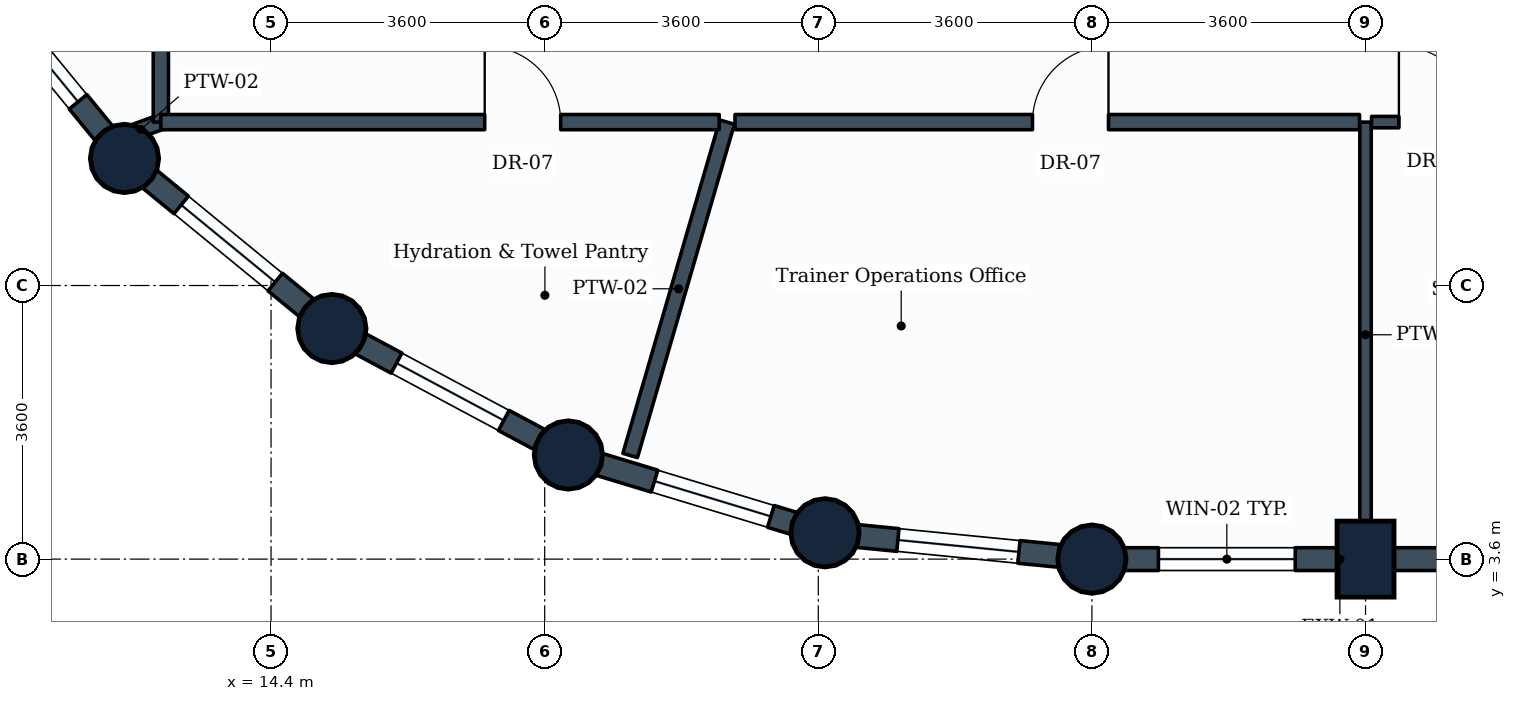
"""IFC4 building model, lengths in metres.
Left out: names, types, materials, properties, quantities, classifications, styles, units other than length and angle.
Written with IfcOpenShell. Run it as: python <this file> out.ifc"""

import sys

from ifc_helpers import new_model, si_unit, direction, frame, frame_2d, origin, origin_2d, place, context, subcontext, project, spatial, rectangle, circle, extrude, element, fill, save


model = new_model("IFC4")
c1 = context("Model", 3, precision=1e-05, world=origin(), true_north=direction((0.0, 1.0)))
c2 = subcontext(c1, "Body", "Model", "MODEL_VIEW")
j1 = project(units=[si_unit("LENGTHUNIT", "METRE"), si_unit("PLANEANGLEUNIT", "RADIAN")], contexts=[c1])
p1 = place(None, origin())
s1 = spatial("IfcSite", under=j1, at=p1, CompositionType="ELEMENT")
p2 = place(p1, origin())
s2 = spatial("IfcBuilding", under=s1, at=p2, CompositionType="ELEMENT")
p3 = place(p2, frame((0.0, 0.0, 142.8)))
s3 = spatial("IfcBuildingStorey", under=s2, at=p3, CompositionType="ELEMENT", Elevation=142.8)
for number, where, z_axis, x_axis in (
    (1, (12.472, 8.872, 0.0), (0.0, 0.0, 1.0), (1.0, 0.0, 0.0)),
    (2, (15.2, 6.634, 0.0), (0.0, 0.0, 1.0), (1.0, 0.0, 0.0)),
    (3, (18.312, 4.97, 0.0), (0.0, 0.0, 1.0), (1.0, 0.0, 0.0)),
    (4, (21.688, 3.946, 0.0), (0.0, 0.0, 1.0), (1.0, 0.0, 0.0)),
    (5, (25.2, 3.6, 0.0), (0.0, 0.0, 1.0), (1.0, 0.0, 0.0)),
):
    element("IfcColumn", number, at=place(p3, frame(where, z_axis=z_axis, x_axis=x_axis)), inside=s3, PredefinedType="COLUMN", context=c2, shape_type="SweptSolid", body=[
        extrude(circle(Radius=0.45, at=origin_2d()), origin(), (0.0, 0.0, 1.0), 3.8),
    ])
p4 = place(p3, frame((28.8, 3.6, 0.0), z_axis=(0.0, 0.0, 1.0), x_axis=(1.0, 0.0, 0.0)))
e6 = element("IfcColumn", 6, at=p4, inside=s3, PredefinedType="COLUMN", context=c2, shape_type="SweptSolid", body=[
    extrude(rectangle(XDim=0.75, YDim=1.0, at=origin_2d()), origin(), (0.0, 0.0, 1.0), 3.8),
])
p5 = place(p3, frame((28.8, 3.6, 0.0), z_axis=(0.0, 0.0, 1.0), x_axis=(-1.0, 0.0, 0.0)))
e7 = element("IfcWall", 7, at=p5, inside=s3, PredefinedType="STANDARD", context=c2, shape_type="SweptSolid", body=[
    extrude(rectangle(XDim=3.6, YDim=0.3, at=frame_2d((1.8, 0.0))), origin(), (0.0, 0.0, 1.0), 2.93),
])
p6 = place(p5, frame((0.925, 0.0, 0.85)))
e8 = element("IfcOpeningElement", 8, at=p6, cuts=e7, PredefinedType="OPENING", context=c2, shape_type="SweptSolid", body=[
    extrude(rectangle(XDim=1.8, YDim=1.35, at=frame_2d((0.9, 0.675))), frame((0.0, 0.16, 0.0), z_axis=(0.0, -1.0, 0.0), x_axis=(1.0, 0.0, 0.0)), (0.0, 0.0, 1.0), 0.32),
])
p7 = place(p3, frame((32.4, 3.6, 0.0), z_axis=(0.0, 0.0, 1.0), x_axis=(-1.0, 0.0, 0.0)))
e9 = element("IfcWall", 9, at=p7, inside=s3, PredefinedType="STANDARD", context=c2, shape_type="SweptSolid", body=[
    extrude(rectangle(XDim=3.6, YDim=0.3, at=frame_2d((1.8, 0.0))), origin(), (0.0, 0.0, 1.0), 2.93),
])
p8 = place(p3, frame((12.472, 8.872, 0.0), z_axis=(0.0, 0.0, 1.0), x_axis=(-0.634258295121, 0.773121216285, 0.0)))
e10 = element("IfcWall", 10, at=p8, inside=s3, PredefinedType="STANDARD", context=c2, shape_type="SweptSolid", body=[
    extrude(rectangle(XDim=3.529, YDim=0.3, at=frame_2d((1.764, 0.0))), origin(), (0.0, 0.0, 1.0), 2.93),
])
p9 = place(p8, frame((0.964, 0.0, 0.85)))
e11 = element("IfcOpeningElement", 11, at=p9, cuts=e10, PredefinedType="OPENING", context=c2, shape_type="SweptSolid", body=[
    extrude(rectangle(XDim=1.6, YDim=1.35, at=frame_2d((0.8, 0.675))), frame((0.0, 0.16, 0.0), z_axis=(0.0, -1.0, 0.0), x_axis=(1.0, 0.0, 0.0)), (0.0, 0.0, 1.0), 0.32),
])
p10 = place(p3, frame((15.2, 6.634, 0.0), z_axis=(0.0, 0.0, 1.0), x_axis=(-0.773121216285, 0.634258295121, 0.0)))
e12 = element("IfcWall", 12, at=p10, inside=s3, PredefinedType="STANDARD", context=c2, shape_type="SweptSolid", body=[
    extrude(rectangle(XDim=3.529, YDim=0.3, at=frame_2d((1.764, 0.0))), origin(), (0.0, 0.0, 1.0), 2.93),
])
p11 = place(p10, frame((0.964, 0.0, 0.85)))
e13 = element("IfcOpeningElement", 13, at=p11, cuts=e12, PredefinedType="OPENING", context=c2, shape_type="SweptSolid", body=[
    extrude(rectangle(XDim=1.6, YDim=1.35, at=frame_2d((0.8, 0.675))), frame((0.0, 0.16, 0.0), z_axis=(0.0, -1.0, 0.0), x_axis=(1.0, 0.0, 0.0)), (0.0, 0.0, 1.0), 0.32),
])
p12 = place(p3, frame((18.312, 4.97, 0.0), z_axis=(0.0, 0.0, 1.0), x_axis=(-0.881846862014, 0.471535907389, 0.0)))
e14 = element("IfcWall", 14, at=p12, inside=s3, PredefinedType="STANDARD", context=c2, shape_type="SweptSolid", body=[
    extrude(rectangle(XDim=3.529, YDim=0.3, at=frame_2d((1.765, 0.0))), origin(), (0.0, 0.0, 1.0), 2.93),
])
p13 = place(p12, frame((0.964, 0.0, 0.85)))
e15 = element("IfcOpeningElement", 15, at=p13, cuts=e14, PredefinedType="OPENING", context=c2, shape_type="SweptSolid", body=[
    extrude(rectangle(XDim=1.6, YDim=1.35, at=frame_2d((0.8, 0.675))), frame((0.0, 0.16, 0.0), z_axis=(0.0, -1.0, 0.0), x_axis=(1.0, 0.0, 0.0)), (0.0, 0.0, 1.0), 0.32),
])
p14 = place(p3, frame((21.688, 3.946, 0.0), z_axis=(0.0, 0.0, 1.0), x_axis=(-0.956953367403, 0.290241714123, 0.0)))
e16 = element("IfcWall", 16, at=p14, inside=s3, PredefinedType="STANDARD", context=c2, shape_type="SweptSolid", body=[
    extrude(rectangle(XDim=3.528, YDim=0.3, at=frame_2d((1.764, 0.0))), origin(), (0.0, 0.0, 1.0), 2.93),
])
p15 = place(p14, frame((0.744, 0.0, 0.85)))
e17 = element("IfcOpeningElement", 17, at=p15, cuts=e16, PredefinedType="OPENING", context=c2, shape_type="SweptSolid", body=[
    extrude(rectangle(XDim=1.6, YDim=1.35, at=frame_2d((0.8, 0.675))), frame((0.0, 0.16, 0.0), z_axis=(0.0, -1.0, 0.0), x_axis=(1.0, 0.0, 0.0)), (0.0, 0.0, 1.0), 0.32),
])
p16 = place(p3, frame((25.2, 3.6, 0.0), z_axis=(0.0, 0.0, 1.0), x_axis=(-0.995183369056, 0.098030923459, 0.0)))
e18 = element("IfcWall", 18, at=p16, inside=s3, PredefinedType="STANDARD", context=c2, shape_type="SweptSolid", body=[
    extrude(rectangle(XDim=3.529, YDim=0.3, at=frame_2d((1.765, 0.0))), origin(), (0.0, 0.0, 1.0), 2.93),
])
p17 = place(p16, frame((0.965, 0.0, 0.85)))
e19 = element("IfcOpeningElement", 19, at=p17, cuts=e18, PredefinedType="OPENING", context=c2, shape_type="SweptSolid", body=[
    extrude(rectangle(XDim=1.6, YDim=1.35, at=frame_2d((0.8, 0.675))), frame((0.0, 0.16, 0.0), z_axis=(0.0, -1.0, 0.0), x_axis=(1.0, 0.0, 0.0)), (0.0, 0.0, 1.0), 0.32),
])
p18 = place(p3, frame((28.8, 9.35, 0.0), z_axis=(0.0, 0.0, 1.0), x_axis=(0.0, -1.0, 0.0)))
e20 = element("IfcWall", 20, at=p18, inside=s3, PredefinedType="PARTITIONING", context=c2, shape_type="SweptSolid", body=[
    extrude(rectangle(XDim=5.596, YDim=0.15, at=frame_2d((2.798, 0.0))), origin(), (0.0, 0.0, 1.0), 3.535),
])
p19 = place(p3, frame((12.95, 9.35, 0.0), z_axis=(0.0, 0.0, 1.0), x_axis=(-0.939538101119, -0.342444384601, 0.0)))
e21 = element("IfcWall", 21, at=p19, inside=s3, PredefinedType="PARTITIONING", context=c2, shape_type="SweptSolid", body=[
    extrude(rectangle(XDim=0.559, YDim=0.2, at=frame_2d((0.279, 0.0))), origin(), (0.0, 0.0, 1.0), 2.93),
])
p20 = place(p3, frame((20.4, 9.35, 0.0), z_axis=(0.0, 0.0, 1.0), x_axis=(-0.279158408615, -0.960245063981, 0.0)))
e22 = element("IfcWall", 22, at=p20, inside=s3, PredefinedType="PARTITIONING", context=c2, shape_type="SweptSolid", body=[
    extrude(rectangle(XDim=4.568, YDim=0.2, at=frame_2d((2.284, 0.0))), origin(), (0.0, 0.0, 1.0), 2.93),
])
p21 = place(p3, frame((12.95, 9.35, 0.0), z_axis=(0.0, 0.0, 1.0), x_axis=(0.0, 1.0, 0.0)))
e23 = element("IfcWall", 23, at=p21, inside=s3, PredefinedType="PARTITIONING", context=c2, shape_type="SweptSolid", body=[
    extrude(rectangle(XDim=7.346, YDim=0.2, at=frame_2d((3.673, 0.0))), origin(), (0.0, 0.0, 1.0), 3.17),
])
p22 = place(p21, frame((4.261, 0.0, 0.0)))
e24 = element("IfcOpeningElement", 24, at=p22, cuts=e23, PredefinedType="OPENING", context=c2, shape_type="SweptSolid", body=[
    extrude(rectangle(XDim=1.0, YDim=2.1, at=frame_2d((0.5, 1.05))), frame((0.0, 0.11, 0.0), z_axis=(0.0, -1.0, 0.0), x_axis=(1.0, 0.0, 0.0)), (0.0, 0.0, 1.0), 0.22),
])
p23 = place(p3, frame((12.95, 9.35, 0.0), z_axis=(0.0, 0.0, 1.0), x_axis=(1.0, 0.0, 0.0)))
e25 = element("IfcWall", 25, at=p23, inside=s3, PredefinedType="PARTITIONING", context=c2, shape_type="SweptSolid", body=[
    extrude(rectangle(XDim=7.346, YDim=0.2, at=frame_2d((3.673, 0.0))), origin(), (0.0, 0.0, 1.0), 3.18),
])
p24 = place(p23, frame((4.261, 0.0, 0.0)))
e26 = element("IfcOpeningElement", 26, at=p24, cuts=e25, PredefinedType="OPENING", context=c2, shape_type="SweptSolid", body=[
    extrude(rectangle(XDim=1.0, YDim=2.1, at=frame_2d((0.5, 1.05))), frame((0.0, 0.11, 0.0), z_axis=(0.0, -1.0, 0.0), x_axis=(1.0, 0.0, 0.0)), (0.0, 0.0, 1.0), 0.22),
])
p25 = place(p3, frame((20.504, 9.35, 0.0), z_axis=(0.0, 0.0, 1.0), x_axis=(1.0, 0.0, 0.0)))
e27 = element("IfcWall", 27, at=p25, inside=s3, PredefinedType="PARTITIONING", context=c2, shape_type="SweptSolid", body=[
    extrude(rectangle(XDim=8.217, YDim=0.2, at=frame_2d((4.108, 0.0))), origin(), (0.0, 0.0, 1.0), 3.17),
])
p26 = place(p25, frame((3.914, 0.0, 0.0)))
e28 = element("IfcOpeningElement", 28, at=p26, cuts=e27, PredefinedType="OPENING", context=c2, shape_type="SweptSolid", body=[
    extrude(rectangle(XDim=1.0, YDim=2.1, at=frame_2d((0.5, 1.05))), frame((0.0, 0.11, 0.0), z_axis=(0.0, -1.0, 0.0), x_axis=(1.0, 0.0, 0.0)), (0.0, 0.0, 1.0), 0.22),
])
p27 = place(p3, frame((28.879, 9.35, 0.0), z_axis=(0.0, 0.0, 1.0), x_axis=(1.0, 0.0, 0.0)))
e29 = element("IfcWall", 29, at=p27, inside=s3, PredefinedType="PARTITIONING", context=c2, shape_type="SweptSolid", body=[
    extrude(rectangle(XDim=5.521, YDim=0.15, at=frame_2d((2.76, 0.0))), origin(), (0.0, 0.0, 1.0), 3.535),
])
p28 = place(p27, frame((0.36, 0.0, 0.0)))
e30 = element("IfcOpeningElement", 30, at=p28, cuts=e29, PredefinedType="OPENING", context=c2, shape_type="SweptSolid", body=[
    extrude(rectangle(XDim=1.0, YDim=2.1, at=frame_2d((0.5, 1.05))), frame((0.0, 0.085, 0.0), z_axis=(0.0, -1.0, 0.0), x_axis=(1.0, 0.0, 0.0)), (0.0, 0.0, 1.0), 0.17),
])
p29 = place(p6, origin())
e31 = element("IfcWindow", 31, at=p29, inside=s3, PartitioningType="SINGLE_PANEL", PredefinedType="WINDOW", context=c2, shape_type="SweptSolid", body=[
    extrude(rectangle(XDim=1.8, YDim=1.35, at=frame_2d((0.9, 0.675))), frame((0.0, 0.03, 0.0), z_axis=(0.0, -1.0, 0.0), x_axis=(1.0, 0.0, 0.0)), (0.0, 0.0, 1.0), 0.06),
])
fill(e8, e31)
p30 = place(p9, origin())
e32 = element("IfcWindow", 32, at=p30, inside=s3, PartitioningType="SINGLE_PANEL", PredefinedType="WINDOW", context=c2, shape_type="SweptSolid", body=[
    extrude(rectangle(XDim=1.6, YDim=1.35, at=frame_2d((0.8, 0.675))), frame((0.0, 0.03, 0.0), z_axis=(0.0, -1.0, 0.0), x_axis=(1.0, 0.0, 0.0)), (0.0, 0.0, 1.0), 0.06),
])
fill(e11, e32)
p31 = place(p11, origin())
e33 = element("IfcWindow", 33, at=p31, inside=s3, PartitioningType="SINGLE_PANEL", PredefinedType="WINDOW", context=c2, shape_type="SweptSolid", body=[
    extrude(rectangle(XDim=1.6, YDim=1.35, at=frame_2d((0.8, 0.675))), frame((0.0, 0.03, 0.0), z_axis=(0.0, -1.0, 0.0), x_axis=(1.0, 0.0, 0.0)), (0.0, 0.0, 1.0), 0.06),
])
fill(e13, e33)
p32 = place(p13, origin())
e34 = element("IfcWindow", 34, at=p32, inside=s3, PartitioningType="SINGLE_PANEL", PredefinedType="WINDOW", context=c2, shape_type="SweptSolid", body=[
    extrude(rectangle(XDim=1.6, YDim=1.35, at=frame_2d((0.8, 0.675))), frame((0.0, 0.03, 0.0), z_axis=(0.0, -1.0, 0.0), x_axis=(1.0, 0.0, 0.0)), (0.0, 0.0, 1.0), 0.06),
])
fill(e15, e34)
p33 = place(p15, origin())
e35 = element("IfcWindow", 35, at=p33, inside=s3, PartitioningType="SINGLE_PANEL", PredefinedType="WINDOW", context=c2, shape_type="SweptSolid", body=[
    extrude(rectangle(XDim=1.6, YDim=1.35, at=frame_2d((0.8, 0.675))), frame((0.0, 0.03, 0.0), z_axis=(0.0, -1.0, 0.0), x_axis=(1.0, 0.0, 0.0)), (0.0, 0.0, 1.0), 0.06),
])
fill(e17, e35)
p34 = place(p17, origin())
e36 = element("IfcWindow", 36, at=p34, inside=s3, PartitioningType="SINGLE_PANEL", PredefinedType="WINDOW", context=c2, shape_type="SweptSolid", body=[
    extrude(rectangle(XDim=1.6, YDim=1.35, at=frame_2d((0.8, 0.675))), frame((0.0, 0.03, 0.0), z_axis=(0.0, -1.0, 0.0), x_axis=(1.0, 0.0, 0.0)), (0.0, 0.0, 1.0), 0.06),
])
fill(e19, e36)
p35 = place(p24, origin())
e37 = element("IfcDoor", 37, at=p35, inside=s3, OperationType="SINGLE_SWING_LEFT", PredefinedType="DOOR", context=c2, shape_type="SweptSolid", body=[
    extrude(rectangle(XDim=1.0, YDim=2.1, at=frame_2d((0.5, 1.05))), frame((0.0, 0.025, 0.0), z_axis=(0.0, -1.0, 0.0), x_axis=(1.0, 0.0, 0.0)), (0.0, 0.0, 1.0), 0.05),
])
fill(e26, e37)
p36 = place(p26, origin())
e38 = element("IfcDoor", 38, at=p36, inside=s3, OperationType="SINGLE_SWING_RIGHT", PredefinedType="DOOR", context=c2, shape_type="SweptSolid", body=[
    extrude(rectangle(XDim=1.0, YDim=2.1, at=frame_2d((0.5, 1.05))), frame((0.0, 0.025, 0.0), z_axis=(0.0, -1.0, 0.0), x_axis=(1.0, 0.0, 0.0)), (0.0, 0.0, 1.0), 0.05),
])
fill(e28, e38)
p37 = place(p28, origin())
e39 = element("IfcDoor", 39, at=p37, inside=s3, OperationType="SINGLE_SWING_LEFT", PredefinedType="DOOR", context=c2, shape_type="SweptSolid", body=[
    extrude(rectangle(XDim=1.0, YDim=2.1, at=frame_2d((0.5, 1.05))), frame((0.0, 0.025, 0.0), z_axis=(0.0, -1.0, 0.0), x_axis=(1.0, 0.0, 0.0)), (0.0, 0.0, 1.0), 0.05),
])
fill(e30, e39)
save(model, sys.argv[1])
